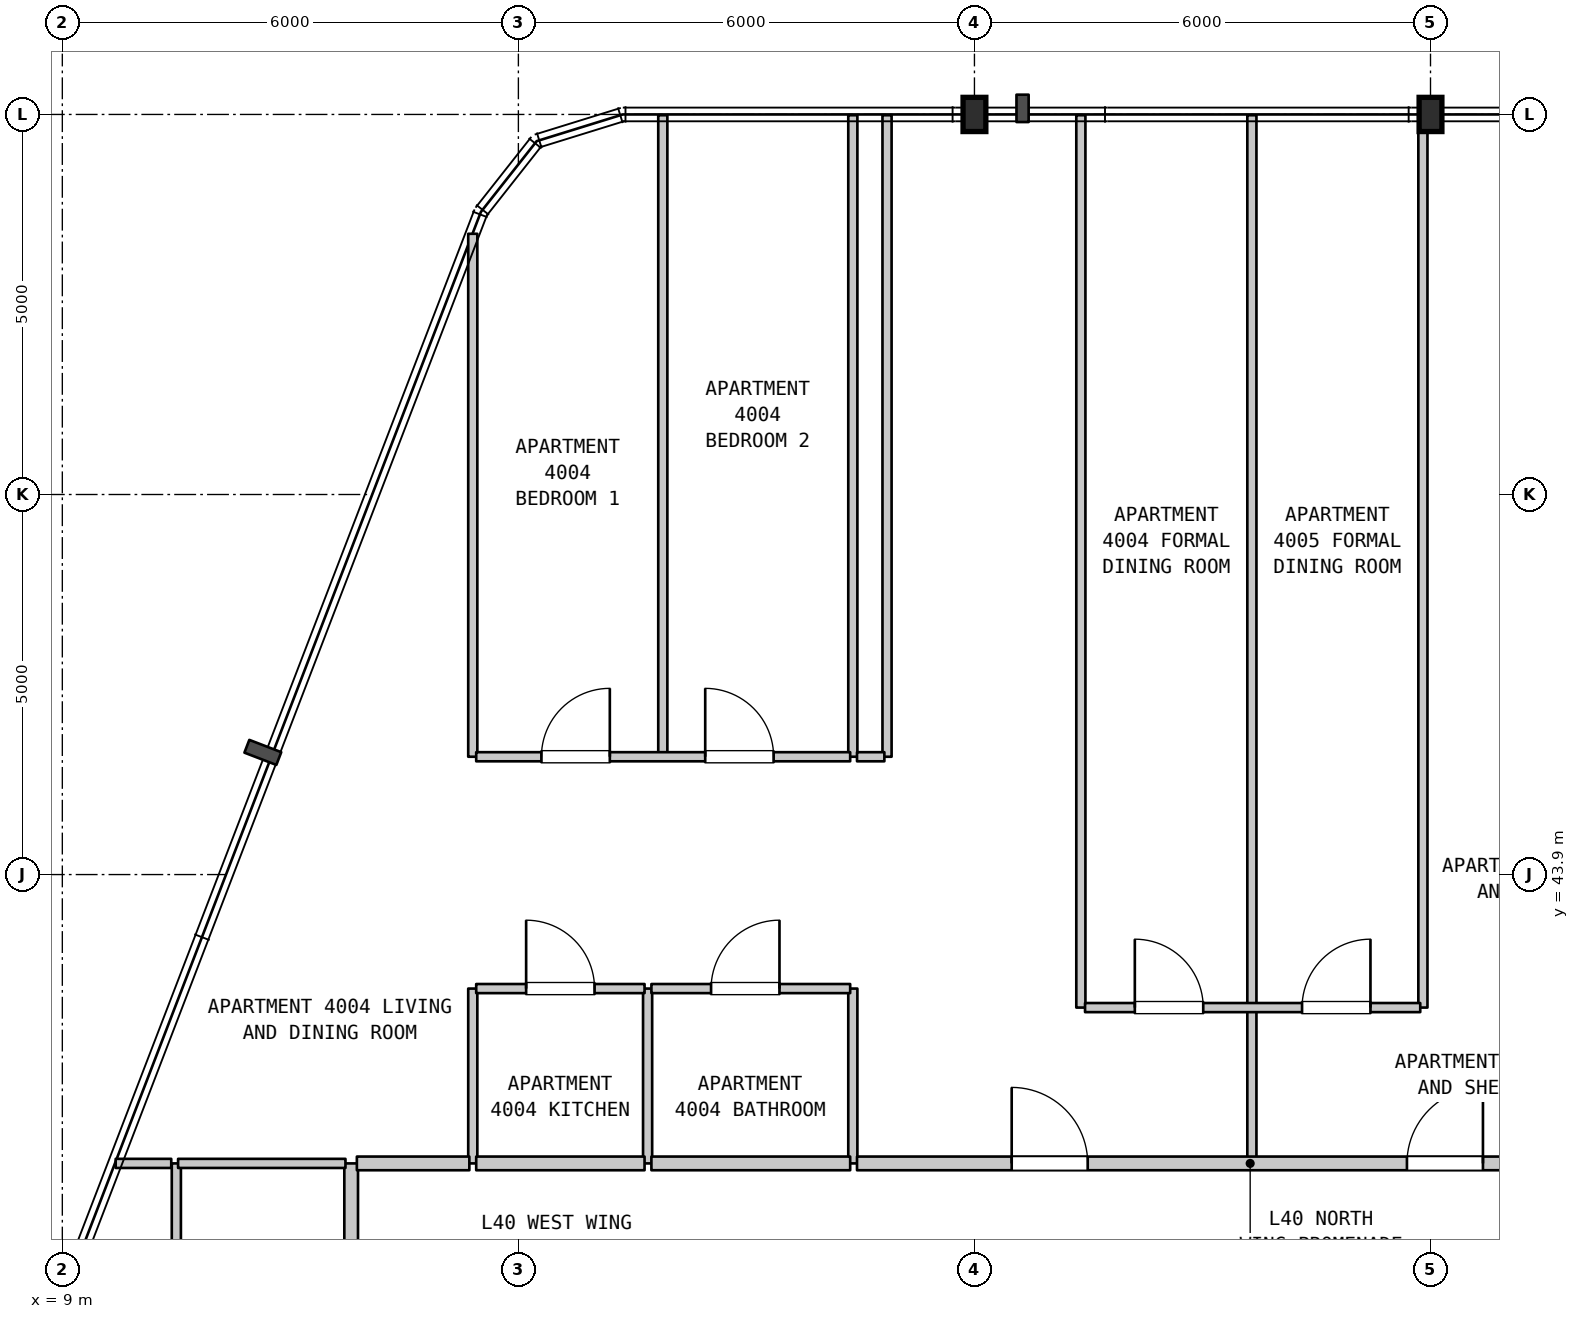
"""IFC4 building model, lengths in metres.
Left out: names, types, materials, properties, quantities, classifications, styles, units other than length and angle.
Written with IfcOpenShell. Run it as: python <this file> out.ifc"""

import sys

from ifc_helpers import new_model, si_unit, direction, frame, frame_2d, origin, origin_2d, place, context, subcontext, project, spatial, rectangle, i_section, extrude, element, fill, save


model = new_model("IFC4")
c1 = context("Model", 3, precision=1e-05, world=origin(), true_north=direction((0.0, 1.0)))
c2 = subcontext(c1, "Body", "Model", "MODEL_VIEW")
j1 = project(units=[si_unit("LENGTHUNIT", "METRE"), si_unit("PLANEANGLEUNIT", "RADIAN")], contexts=[c1])
p1 = place(None, origin())
s1 = spatial("IfcSite", under=j1, at=p1, CompositionType="ELEMENT")
p2 = place(p1, origin())
s2 = spatial("IfcBuilding", under=s1, at=p2, CompositionType="ELEMENT")
p3 = place(p2, frame((0.0, 0.0, 164.6)))
s3 = spatial("IfcBuildingStorey", under=s2, at=p3, CompositionType="ELEMENT", Elevation=164.6)
for number, where, z_axis, x_axis in (
    (1, (21.0, 53.9, 0.0), (0.0, 0.0, 1.0), (1.0, 0.0, 0.0)),
    (2, (27.0, 53.9, 0.0), (0.0, 0.0, 1.0), (1.0, 0.0, 0.0)),
):
    element("IfcColumn", number, at=place(p3, frame(where, z_axis=z_axis, x_axis=x_axis)), inside=s3, PredefinedType="COLUMN", context=c2, shape_type="SweptSolid", body=[
        extrude(i_section(OverallWidth=0.3, OverallDepth=0.45, WebThickness=0.014, FlangeThickness=0.026, FilletRadius=0.027, at=origin_2d()), origin(), (0.0, 0.0, 1.0), 4.5),
    ])
p4 = place(p3, frame((10.5, 31.45, 0.0), z_axis=(0.0, 0.0, 1.0), x_axis=(0.0, 1.0, 0.0)))
e3 = element("IfcWall", 3, at=p4, inside=s3, PredefinedType="PARTITIONING", context=c2, shape_type="SweptSolid", body=[
    extrude(rectangle(XDim=8.65, YDim=0.12, at=frame_2d((4.325, 0.0))), origin(), (0.0, 0.0, 1.0), 4.19),
])
p5 = place(p3, frame((12.8, 31.45, 0.0), z_axis=(0.0, 0.0, 1.0), x_axis=(0.0, 1.0, 0.0)))
e4 = element("IfcWall", 4, at=p5, inside=s3, PredefinedType="STANDARD", context=c2, shape_type="SweptSolid", body=[
    extrude(rectangle(XDim=8.65, YDim=0.18, at=frame_2d((4.325, 0.0))), origin(), (0.0, 0.0, 1.0), 4.19),
])
p6 = place(p3, frame((14.4, 40.1, 0.0), z_axis=(0.0, 0.0, 1.0), x_axis=(0.0, 1.0, 0.0)))
e5 = element("IfcWall", 5, at=p6, inside=s3, PredefinedType="PARTITIONING", context=c2, shape_type="SweptSolid", body=[
    extrude(rectangle(XDim=2.3, YDim=0.12, at=frame_2d((1.15, 0.0))), origin(), (0.0, 0.0, 1.0), 4.19),
])
p7 = place(p3, frame((14.4, 45.45, 0.0), z_axis=(0.0, 0.0, 1.0), x_axis=(0.0, 1.0, 0.0)))
e6 = element("IfcWall", 6, at=p7, inside=s3, PredefinedType="PARTITIONING", context=c2, shape_type="SweptSolid", body=[
    extrude(rectangle(XDim=6.88, YDim=0.12, at=frame_2d((3.44, 0.0))), origin(), (0.0, 0.0, 1.0), 4.19),
])
p8 = place(p3, frame((16.7, 40.1, 0.0), z_axis=(0.0, 0.0, 1.0), x_axis=(0.0, 1.0, 0.0)))
e7 = element("IfcWall", 7, at=p8, inside=s3, PredefinedType="PARTITIONING", context=c2, shape_type="SweptSolid", body=[
    extrude(rectangle(XDim=2.3, YDim=0.12, at=frame_2d((1.15, 0.0))), origin(), (0.0, 0.0, 1.0), 4.19),
])
p9 = place(p3, frame((16.9, 45.45, 0.0), z_axis=(0.0, 0.0, 1.0), x_axis=(0.0, 1.0, 0.0)))
e8 = element("IfcWall", 8, at=p9, inside=s3, PredefinedType="PARTITIONING", context=c2, shape_type="SweptSolid", body=[
    extrude(rectangle(XDim=8.44, YDim=0.12, at=frame_2d((4.22, 0.0))), origin(), (0.0, 0.0, 1.0), 4.19),
])
p10 = place(p3, frame((19.4, 40.1, 0.0), z_axis=(0.0, 0.0, 1.0), x_axis=(0.0, 1.0, 0.0)))
e9 = element("IfcWall", 9, at=p10, inside=s3, PredefinedType="PARTITIONING", context=c2, shape_type="SweptSolid", body=[
    extrude(rectangle(XDim=2.3, YDim=0.12, at=frame_2d((1.15, 0.0))), origin(), (0.0, 0.0, 1.0), 4.19),
])
for number, where, z_axis, x_axis in (
    (10, (19.4, 45.45, 0.0), (0.0, 0.0, 1.0), (0.0, 1.0, 0.0)),
    (11, (19.85, 45.45, 0.0), (0.0, 0.0, 1.0), (0.0, 1.0, 0.0)),
):
    element("IfcWall", number, at=place(p3, frame(where, z_axis=z_axis, x_axis=x_axis)), inside=s3, PredefinedType="PARTITIONING", context=c2, shape_type="SweptSolid", body=[
        extrude(rectangle(XDim=8.44, YDim=0.12, at=frame_2d((4.22, 0.0))), origin(), (0.0, 0.0, 1.0), 4.19),
    ])
p11 = place(p3, frame((22.4, 42.15, 0.0), z_axis=(0.0, 0.0, 1.0), x_axis=(0.0, 1.0, 0.0)))
e12 = element("IfcWall", 12, at=p11, inside=s3, PredefinedType="PARTITIONING", context=c2, shape_type="SweptSolid", body=[
    extrude(rectangle(XDim=11.74, YDim=0.12, at=frame_2d((5.87, 0.0))), origin(), (0.0, 0.0, 1.0), 4.19),
])
p12 = place(p3, frame((24.65, 40.1, 0.0), z_axis=(0.0, 0.0, 1.0), x_axis=(0.0, 1.0, 0.0)))
e13 = element("IfcWall", 13, at=p12, inside=s3, PredefinedType="PARTITIONING", context=c2, shape_type="SweptSolid", body=[
    extrude(rectangle(XDim=2.05, YDim=0.12, at=frame_2d((1.025, 0.0))), origin(), (0.0, 0.0, 1.0), 4.19),
])
for number, where, z_axis, x_axis in (
    (14, (24.65, 42.15, 0.0), (0.0, 0.0, 1.0), (0.0, 1.0, 0.0)),
    (15, (26.9, 42.15, 0.0), (0.0, 0.0, 1.0), (0.0, 1.0, 0.0)),
):
    element("IfcWall", number, at=place(p3, frame(where, z_axis=z_axis, x_axis=x_axis)), inside=s3, PredefinedType="PARTITIONING", context=c2, shape_type="SweptSolid", body=[
        extrude(rectangle(XDim=11.74, YDim=0.12, at=frame_2d((5.87, 0.0))), origin(), (0.0, 0.0, 1.0), 4.19),
    ])
p13 = place(p3, frame((9.702, 40.1, 0.0), z_axis=(0.0, 0.0, 1.0), x_axis=(1.0, 0.0, 0.0)))
e16 = element("IfcWall", 16, at=p13, inside=s3, PredefinedType="PARTITIONING", context=c2, shape_type="SweptSolid", body=[
    extrude(rectangle(XDim=0.731, YDim=0.12, at=frame_2d((0.366, 0.0))), origin(), (0.0, 0.0, 1.0), 4.19),
])
p14 = place(p3, frame((10.523, 40.1, 0.0), z_axis=(0.0, 0.0, 1.0), x_axis=(1.0, 0.0, 0.0)))
e17 = element("IfcWall", 17, at=p14, inside=s3, PredefinedType="PARTITIONING", context=c2, shape_type="SweptSolid", body=[
    extrude(rectangle(XDim=2.202, YDim=0.12, at=frame_2d((1.101, 0.0))), origin(), (0.0, 0.0, 1.0), 4.19),
])
p15 = place(p3, frame((12.875, 40.1, 0.0), z_axis=(0.0, 0.0, 1.0), x_axis=(1.0, 0.0, 0.0)))
e18 = element("IfcWall", 18, at=p15, inside=s3, PredefinedType="STANDARD", context=c2, shape_type="SweptSolid", body=[
    extrude(rectangle(XDim=1.48, YDim=0.18, at=frame_2d((0.74, 0.0))), origin(), (0.0, 0.0, 1.0), 4.19),
])
p16 = place(p3, frame((14.445, 40.1, 0.0), z_axis=(0.0, 0.0, 1.0), x_axis=(1.0, 0.0, 0.0)))
e19 = element("IfcWall", 19, at=p16, inside=s3, PredefinedType="STANDARD", context=c2, shape_type="SweptSolid", body=[
    extrude(rectangle(XDim=2.215, YDim=0.18, at=frame_2d((1.107, 0.0))), origin(), (0.0, 0.0, 1.0), 4.19),
])
p17 = place(p3, frame((16.75, 40.1, 0.0), z_axis=(0.0, 0.0, 1.0), x_axis=(1.0, 0.0, 0.0)))
e20 = element("IfcWall", 20, at=p17, inside=s3, PredefinedType="STANDARD", context=c2, shape_type="SweptSolid", body=[
    extrude(rectangle(XDim=2.615, YDim=0.18, at=frame_2d((1.308, 0.0))), origin(), (0.0, 0.0, 1.0), 4.19),
])
p18 = place(p3, frame((19.455, 40.1, 0.0), z_axis=(0.0, 0.0, 1.0), x_axis=(1.0, 0.0, 0.0)))
e21 = element("IfcWall", 21, at=p18, inside=s3, PredefinedType="STANDARD", context=c2, shape_type="SweptSolid", body=[
    extrude(rectangle(XDim=10.345, YDim=0.18, at=frame_2d((5.172, 0.0))), origin(), (0.0, 0.0, 1.0), 4.19),
])
p19 = place(p18, frame((2.035, 0.0, 0.0)))
e22 = element("IfcOpeningElement", 22, at=p19, cuts=e21, PredefinedType="OPENING", context=c2, shape_type="SweptSolid", body=[
    extrude(rectangle(XDim=1.0, YDim=2.15, at=frame_2d((0.5, 1.075))), frame((0.0, 0.1, 0.0), z_axis=(0.0, -1.0, 0.0), x_axis=(1.0, 0.0, 0.0)), (0.0, 0.0, 1.0), 0.2),
])
p20 = place(p18, frame((7.235, 0.0, 0.0)))
e23 = element("IfcOpeningElement", 23, at=p20, cuts=e21, PredefinedType="OPENING", context=c2, shape_type="SweptSolid", body=[
    extrude(rectangle(XDim=1.0, YDim=2.15, at=frame_2d((0.5, 1.075))), frame((0.0, 0.1, 0.0), z_axis=(0.0, -1.0, 0.0), x_axis=(1.0, 0.0, 0.0)), (0.0, 0.0, 1.0), 0.2),
])
p21 = place(p3, frame((22.455, 42.15, 0.0), z_axis=(0.0, 0.0, 1.0), x_axis=(1.0, 0.0, 0.0)))
e24 = element("IfcWall", 24, at=p21, inside=s3, PredefinedType="PARTITIONING", context=c2, shape_type="SweptSolid", body=[
    extrude(rectangle(XDim=4.41, YDim=0.12, at=frame_2d((2.205, 0.0))), origin(), (0.0, 0.0, 1.0), 4.19),
])
p22 = place(p21, frame((0.655, 0.0, 0.0)))
e25 = element("IfcOpeningElement", 25, at=p22, cuts=e24, PredefinedType="OPENING", context=c2, shape_type="SweptSolid", body=[
    extrude(rectangle(XDim=0.9, YDim=2.15, at=frame_2d((0.45, 1.075))), frame((0.0, 0.07, 0.0), z_axis=(0.0, -1.0, 0.0), x_axis=(1.0, 0.0, 0.0)), (0.0, 0.0, 1.0), 0.14),
])
p23 = place(p21, frame((2.855, 0.0, 0.0)))
e26 = element("IfcOpeningElement", 26, at=p23, cuts=e24, PredefinedType="OPENING", context=c2, shape_type="SweptSolid", body=[
    extrude(rectangle(XDim=0.9, YDim=2.15, at=frame_2d((0.45, 1.075))), frame((0.0, 0.07, 0.0), z_axis=(0.0, -1.0, 0.0), x_axis=(1.0, 0.0, 0.0)), (0.0, 0.0, 1.0), 0.14),
])
p24 = place(p3, frame((14.445, 42.4, 0.0), z_axis=(0.0, 0.0, 1.0), x_axis=(1.0, 0.0, 0.0)))
e27 = element("IfcWall", 27, at=p24, inside=s3, PredefinedType="PARTITIONING", context=c2, shape_type="SweptSolid", body=[
    extrude(rectangle(XDim=2.215, YDim=0.12, at=frame_2d((1.107, 0.0))), origin(), (0.0, 0.0, 1.0), 4.19),
])
p25 = place(p24, frame((0.657, 0.0, 0.0)))
e28 = element("IfcOpeningElement", 28, at=p25, cuts=e27, PredefinedType="OPENING", context=c2, shape_type="SweptSolid", body=[
    extrude(rectangle(XDim=0.9, YDim=2.15, at=frame_2d((0.45, 1.075))), frame((0.0, 0.07, 0.0), z_axis=(0.0, -1.0, 0.0), x_axis=(1.0, 0.0, 0.0)), (0.0, 0.0, 1.0), 0.14),
])
p26 = place(p3, frame((16.75, 42.4, 0.0), z_axis=(0.0, 0.0, 1.0), x_axis=(1.0, 0.0, 0.0)))
e29 = element("IfcWall", 29, at=p26, inside=s3, PredefinedType="PARTITIONING", context=c2, shape_type="SweptSolid", body=[
    extrude(rectangle(XDim=2.615, YDim=0.12, at=frame_2d((1.308, 0.0))), origin(), (0.0, 0.0, 1.0), 4.19),
])
p27 = place(p26, frame((0.785, 0.0, 0.0)))
e30 = element("IfcOpeningElement", 30, at=p27, cuts=e29, PredefinedType="OPENING", context=c2, shape_type="SweptSolid", body=[
    extrude(rectangle(XDim=0.9, YDim=2.1, at=frame_2d((0.45, 1.05))), frame((0.0, 0.07, 0.0), z_axis=(0.0, -1.0, 0.0), x_axis=(1.0, 0.0, 0.0)), (0.0, 0.0, 1.0), 0.14),
])
p28 = place(p3, frame((14.445, 45.45, 0.0), z_axis=(0.0, 0.0, 1.0), x_axis=(1.0, 0.0, 0.0)))
e31 = element("IfcWall", 31, at=p28, inside=s3, PredefinedType="PARTITIONING", context=c2, shape_type="SweptSolid", body=[
    extrude(rectangle(XDim=4.92, YDim=0.12, at=frame_2d((2.46, 0.0))), origin(), (0.0, 0.0, 1.0), 4.19),
])
p29 = place(p28, frame((0.858, 0.0, 0.0)))
e32 = element("IfcOpeningElement", 32, at=p29, cuts=e31, PredefinedType="OPENING", context=c2, shape_type="SweptSolid", body=[
    extrude(rectangle(XDim=0.9, YDim=2.15, at=frame_2d((0.45, 1.075))), frame((0.0, 0.07, 0.0), z_axis=(0.0, -1.0, 0.0), x_axis=(1.0, 0.0, 0.0)), (0.0, 0.0, 1.0), 0.14),
])
p30 = place(p28, frame((3.013, 0.0, 0.0)))
e33 = element("IfcOpeningElement", 33, at=p30, cuts=e31, PredefinedType="OPENING", context=c2, shape_type="SweptSolid", body=[
    extrude(rectangle(XDim=0.9, YDim=2.15, at=frame_2d((0.45, 1.075))), frame((0.0, 0.07, 0.0), z_axis=(0.0, -1.0, 0.0), x_axis=(1.0, 0.0, 0.0)), (0.0, 0.0, 1.0), 0.14),
])
p31 = place(p3, frame((19.455, 45.45, 0.0), z_axis=(0.0, 0.0, 1.0), x_axis=(1.0, 0.0, 0.0)))
e34 = element("IfcWall", 34, at=p31, inside=s3, PredefinedType="PARTITIONING", context=c2, shape_type="SweptSolid", body=[
    extrude(rectangle(XDim=0.36, YDim=0.12, at=frame_2d((0.18, 0.0))), origin(), (0.0, 0.0, 1.0), 4.19),
])
p32 = place(p19, origin())
e35 = element("IfcDoor", 35, at=p32, inside=s3, OperationType="SINGLE_SWING_LEFT", PredefinedType="DOOR", context=c2, shape_type="SweptSolid", body=[
    extrude(rectangle(XDim=1.0, YDim=2.15, at=frame_2d((0.5, 1.075))), frame((0.0, 0.025, 0.0), z_axis=(0.0, -1.0, 0.0), x_axis=(1.0, 0.0, 0.0)), (0.0, 0.0, 1.0), 0.05),
])
fill(e22, e35)
p33 = place(p20, origin())
e36 = element("IfcDoor", 36, at=p33, inside=s3, OperationType="SINGLE_SWING_RIGHT", PredefinedType="DOOR", context=c2, shape_type="SweptSolid", body=[
    extrude(rectangle(XDim=1.0, YDim=2.15, at=frame_2d((0.5, 1.075))), frame((0.0, 0.025, 0.0), z_axis=(0.0, -1.0, 0.0), x_axis=(1.0, 0.0, 0.0)), (0.0, 0.0, 1.0), 0.05),
])
fill(e23, e36)
p34 = place(p22, origin())
e37 = element("IfcDoor", 37, at=p34, inside=s3, OperationType="SINGLE_SWING_LEFT", PredefinedType="DOOR", context=c2, shape_type="SweptSolid", body=[
    extrude(rectangle(XDim=0.9, YDim=2.15, at=frame_2d((0.45, 1.075))), frame((0.0, 0.025, 0.0), z_axis=(0.0, -1.0, 0.0), x_axis=(1.0, 0.0, 0.0)), (0.0, 0.0, 1.0), 0.05),
])
fill(e25, e37)
p35 = place(p23, origin())
e38 = element("IfcDoor", 38, at=p35, inside=s3, OperationType="SINGLE_SWING_RIGHT", PredefinedType="DOOR", context=c2, shape_type="SweptSolid", body=[
    extrude(rectangle(XDim=0.9, YDim=2.15, at=frame_2d((0.45, 1.075))), frame((0.0, 0.025, 0.0), z_axis=(0.0, -1.0, 0.0), x_axis=(1.0, 0.0, 0.0)), (0.0, 0.0, 1.0), 0.05),
])
fill(e26, e38)
p36 = place(p25, origin())
e39 = element("IfcDoor", 39, at=p36, inside=s3, OperationType="SINGLE_SWING_LEFT", PredefinedType="DOOR", context=c2, shape_type="SweptSolid", body=[
    extrude(rectangle(XDim=0.9, YDim=2.15, at=frame_2d((0.45, 1.075))), frame((0.0, 0.025, 0.0), z_axis=(0.0, -1.0, 0.0), x_axis=(1.0, 0.0, 0.0)), (0.0, 0.0, 1.0), 0.05),
])
fill(e28, e39)
p37 = place(p27, origin())
e40 = element("IfcDoor", 40, at=p37, inside=s3, OperationType="SINGLE_SWING_RIGHT", PredefinedType="DOOR", context=c2, shape_type="SweptSolid", body=[
    extrude(rectangle(XDim=0.9, YDim=2.1, at=frame_2d((0.45, 1.05))), frame((0.0, 0.025, 0.0), z_axis=(0.0, -1.0, 0.0), x_axis=(1.0, 0.0, 0.0)), (0.0, 0.0, 1.0), 0.05),
])
fill(e30, e40)
p38 = place(p29, origin())
e41 = element("IfcDoor", 41, at=p38, inside=s3, OperationType="SINGLE_SWING_RIGHT", PredefinedType="DOOR", context=c2, shape_type="SweptSolid", body=[
    extrude(rectangle(XDim=0.9, YDim=2.15, at=frame_2d((0.45, 1.075))), frame((0.0, 0.025, 0.0), z_axis=(0.0, -1.0, 0.0), x_axis=(1.0, 0.0, 0.0)), (0.0, 0.0, 1.0), 0.05),
])
fill(e32, e41)
p39 = place(p30, origin())
e42 = element("IfcDoor", 42, at=p39, inside=s3, OperationType="SINGLE_SWING_LEFT", PredefinedType="DOOR", context=c2, shape_type="SweptSolid", body=[
    extrude(rectangle(XDim=0.9, YDim=2.15, at=frame_2d((0.45, 1.075))), frame((0.0, 0.025, 0.0), z_axis=(0.0, -1.0, 0.0), x_axis=(1.0, 0.0, 0.0)), (0.0, 0.0, 1.0), 0.05),
])
fill(e33, e42)
save(model, sys.argv[1])
